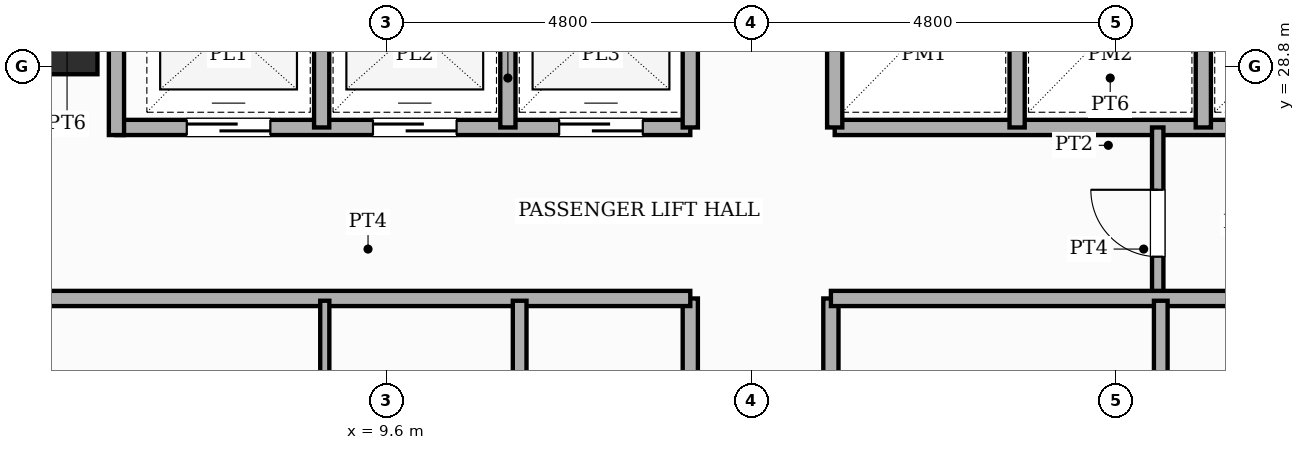
"""IFC4 building model, lengths in metres.
Left out: names, types, materials, properties, quantities, classifications, styles, units other than length and angle.
Written with IfcOpenShell. Run it as: python <this file> out.ifc"""

import sys

from ifc_helpers import new_model, si_unit, direction, frame, frame_2d, origin, origin_2d, place, context, subcontext, project, spatial, rectangle, extrude, element, fill, save


model = new_model("IFC4")
c1 = context("Model", 3, precision=1e-05, world=origin(), true_north=direction((0.0, 1.0)))
c2 = subcontext(c1, "Body", "Model", "MODEL_VIEW")
j1 = project(units=[si_unit("LENGTHUNIT", "METRE"), si_unit("PLANEANGLEUNIT", "RADIAN")], contexts=[c1])
p1 = place(None, origin())
s1 = spatial("IfcSite", under=j1, at=p1, CompositionType="ELEMENT")
p2 = place(p1, origin())
s2 = spatial("IfcBuilding", under=s1, at=p2, CompositionType="ELEMENT")
p3 = place(p2, frame((0.0, 0.0, 57.4)))
s3 = spatial("IfcBuildingStorey", under=s2, at=p3, CompositionType="ELEMENT", Elevation=57.4)
p4 = place(p3, frame((5.25, 29.25, 0.0), z_axis=(0.0, 0.0, 1.0), x_axis=(1.0, 0.0, 0.0)))
e1 = element("IfcColumn", 1, at=p4, inside=s3, PredefinedType="COLUMN", context=c2, shape_type="SweptSolid", body=[
    extrude(rectangle(XDim=1.1, YDim=1.1, at=origin_2d()), origin(), (0.0, 0.0, 1.0), 3.6),
])
p5 = place(p3, frame((6.05, 28.0, 0.0), z_axis=(0.0, 0.0, 1.0), x_axis=(1.0, 0.0, 0.0)))
e2 = element("IfcWall", 2, at=p5, inside=s3, PredefinedType="POLYGONAL", context=c2, shape_type="SweptSolid", body=[
    extrude(rectangle(XDim=7.55, YDim=0.2, at=frame_2d((3.775, 0.0))), origin(), (0.0, 0.0, 1.0), 3.35),
])
p6 = place(p5, frame((0.925, 0.0, 0.0)))
e3 = element("IfcOpeningElement", 3, at=p6, cuts=e2, PredefinedType="OPENING", context=c2, shape_type="SweptSolid", body=[
    extrude(rectangle(XDim=1.1, YDim=2.15, at=frame_2d((0.55, 1.075))), frame((0.0, 0.11, 0.0), z_axis=(0.0, -1.0, 0.0), x_axis=(1.0, 0.0, 0.0)), (0.0, 0.0, 1.0), 0.22),
])
p7 = place(p5, frame((3.375, 0.0, 0.0)))
e4 = element("IfcOpeningElement", 4, at=p7, cuts=e2, PredefinedType="OPENING", context=c2, shape_type="SweptSolid", body=[
    extrude(rectangle(XDim=1.1, YDim=2.15, at=frame_2d((0.55, 1.075))), frame((0.0, 0.11, 0.0), z_axis=(0.0, -1.0, 0.0), x_axis=(1.0, 0.0, 0.0)), (0.0, 0.0, 1.0), 0.22),
])
p8 = place(p5, frame((5.825, 0.0, 0.0)))
e5 = element("IfcOpeningElement", 5, at=p8, cuts=e2, PredefinedType="OPENING", context=c2, shape_type="SweptSolid", body=[
    extrude(rectangle(XDim=1.1, YDim=2.15, at=frame_2d((0.55, 1.075))), frame((0.0, 0.11, 0.0), z_axis=(0.0, -1.0, 0.0), x_axis=(1.0, 0.0, 0.0)), (0.0, 0.0, 1.0), 0.22),
])
p9 = place(p3, frame((15.5, 28.0, 0.0), z_axis=(0.0, 0.0, 1.0), x_axis=(1.0, 0.0, 0.0)))
e6 = element("IfcWall", 6, at=p9, inside=s3, PredefinedType="POLYGONAL", context=c2, shape_type="SweptSolid", body=[
    extrude(rectangle(XDim=7.25, YDim=0.2, at=frame_2d((3.625, 0.0))), origin(), (0.0, 0.0, 1.0), 3.35),
])
p10 = place(p3, frame((6.05, 27.9, 0.0), z_axis=(0.0, 0.0, 1.0), x_axis=(0.0, 1.0, 0.0)))
e7 = element("IfcWall", 7, at=p10, inside=s3, PredefinedType="POLYGONAL", context=c2, shape_type="SweptSolid", body=[
    extrude(rectangle(XDim=3.0, YDim=0.2, at=frame_2d((1.5, 0.0))), origin(), (0.0, 0.0, 1.0), 3.35),
])
for number, where, z_axis, x_axis in (
    (8, (13.6, 28.0, 0.0), (0.0, 0.0, 1.0), (0.0, 1.0, 0.0)),
    (9, (15.5, 28.0, 0.0), (0.0, 0.0, 1.0), (0.0, 1.0, 0.0)),
    (10, (8.75, 28.0, 0.0), (0.0, 0.0, 1.0), (0.0, 1.0, 0.0)),
    (11, (11.2, 28.0, 0.0), (0.0, 0.0, 1.0), (0.0, 1.0, 0.0)),
    (12, (17.9, 28.0, 0.0), (0.0, 0.0, 1.0), (0.0, 1.0, 0.0)),
    (13, (20.35, 28.0, 0.0), (0.0, 0.0, 1.0), (0.0, 1.0, 0.0)),
):
    element("IfcWall", number, at=place(p3, frame(where, z_axis=z_axis, x_axis=x_axis)), inside=s3, PredefinedType="POLYGONAL", context=c2, shape_type="SweptSolid", body=[
        extrude(rectangle(XDim=2.9, YDim=0.2, at=frame_2d((1.45, 0.0))), origin(), (0.0, 0.0, 1.0), 3.35),
    ])
p11 = place(p3, frame((19.75, 25.75, 0.0), z_axis=(0.0, 0.0, 1.0), x_axis=(0.0, 1.0, 0.0)))
e14 = element("IfcWall", 14, at=p11, inside=s3, PredefinedType="PARTITIONING", context=c2, shape_type="SweptSolid", body=[
    extrude(rectangle(XDim=2.25, YDim=0.15, at=frame_2d((1.125, 0.0))), origin(), (0.0, 0.0, 1.0), 3.35),
])
p12 = place(p11, frame((0.55, 0.0, 0.0)))
e15 = element("IfcOpeningElement", 15, at=p12, cuts=e14, PredefinedType="OPENING", context=c2, shape_type="SweptSolid", body=[
    extrude(rectangle(XDim=0.88, YDim=2.1, at=frame_2d((0.44, 1.05))), frame((0.0, 0.085, 0.0), z_axis=(0.0, -1.0, 0.0), x_axis=(1.0, 0.0, 0.0)), (0.0, 0.0, 1.0), 0.17),
])
p13 = place(p3, frame((13.6, 5.12, 0.0), z_axis=(0.0, 0.0, 1.0), x_axis=(0.0, 1.0, 0.0)))
e16 = element("IfcWall", 16, at=p13, inside=s3, PredefinedType="PARTITIONING", context=c2, shape_type="SweptSolid", body=[
    extrude(rectangle(XDim=20.63, YDim=0.2, at=frame_2d((10.315, 0.0))), origin(), (0.0, 0.0, 1.0), 3.35),
])
p14 = place(p13, frame((2.939, 0.0, 0.0)))
e17 = element("IfcOpeningElement", 17, at=p14, cuts=e16, PredefinedType="OPENING", context=c2, shape_type="SweptSolid", body=[
    extrude(rectangle(XDim=0.98, YDim=2.18, at=frame_2d((0.49, 1.09))), frame((0.0, 0.11, 0.0), z_axis=(0.0, -1.0, 0.0), x_axis=(1.0, 0.0, 0.0)), (0.0, 0.0, 1.0), 0.22),
])
p15 = place(p13, frame((12.576, 0.0, 0.0)))
e18 = element("IfcOpeningElement", 18, at=p15, cuts=e16, PredefinedType="OPENING", context=c2, shape_type="SweptSolid", body=[
    extrude(rectangle(XDim=0.98, YDim=2.18, at=frame_2d((0.49, 1.09))), frame((0.0, 0.11, 0.0), z_axis=(0.0, -1.0, 0.0), x_axis=(1.0, 0.0, 0.0)), (0.0, 0.0, 1.0), 0.22),
])
p16 = place(p3, frame((15.45, 5.12, 0.0), z_axis=(0.0, 0.0, 1.0), x_axis=(0.0, 1.0, 0.0)))
e19 = element("IfcWall", 19, at=p16, inside=s3, PredefinedType="PARTITIONING", context=c2, shape_type="SweptSolid", body=[
    extrude(rectangle(XDim=20.63, YDim=0.2, at=frame_2d((10.315, 0.0))), origin(), (0.0, 0.0, 1.0), 3.35),
])
p17 = place(p16, frame((1.001, 0.0, 0.0)))
e20 = element("IfcOpeningElement", 20, at=p17, cuts=e19, PredefinedType="OPENING", context=c2, shape_type="SweptSolid", body=[
    extrude(rectangle(XDim=0.98, YDim=2.18, at=frame_2d((0.49, 1.09))), frame((0.0, 0.11, 0.0), z_axis=(0.0, -1.0, 0.0), x_axis=(1.0, 0.0, 0.0)), (0.0, 0.0, 1.0), 0.22),
])
p18 = place(p16, frame((5.88, 0.0, 0.0)))
e21 = element("IfcOpeningElement", 21, at=p18, cuts=e19, PredefinedType="OPENING", context=c2, shape_type="SweptSolid", body=[
    extrude(rectangle(XDim=0.98, YDim=2.18, at=frame_2d((0.49, 1.09))), frame((0.0, 0.11, 0.0), z_axis=(0.0, -1.0, 0.0), x_axis=(1.0, 0.0, 0.0)), (0.0, 0.0, 1.0), 0.22),
])
p19 = place(p16, frame((11.28, 0.0, 0.0)))
e22 = element("IfcOpeningElement", 22, at=p19, cuts=e19, PredefinedType="OPENING", context=c2, shape_type="SweptSolid", body=[
    extrude(rectangle(XDim=0.98, YDim=2.18, at=frame_2d((0.49, 1.09))), frame((0.0, 0.11, 0.0), z_axis=(0.0, -1.0, 0.0), x_axis=(1.0, 0.0, 0.0)), (0.0, 0.0, 1.0), 0.22),
])
p20 = place(p16, frame((16.28, 0.0, 0.0)))
e23 = element("IfcOpeningElement", 23, at=p20, cuts=e19, PredefinedType="OPENING", context=c2, shape_type="SweptSolid", body=[
    extrude(rectangle(XDim=0.98, YDim=2.18, at=frame_2d((0.49, 1.09))), frame((0.0, 0.11, 0.0), z_axis=(0.0, -1.0, 0.0), x_axis=(1.0, 0.0, 0.0)), (0.0, 0.0, 1.0), 0.22),
])
p21 = place(p3, frame((5.12, 25.75, 0.0), z_axis=(0.0, 0.0, 1.0), x_axis=(1.0, 0.0, 0.0)))
e24 = element("IfcWall", 24, at=p21, inside=s3, PredefinedType="PARTITIONING", context=c2, shape_type="SweptSolid", body=[
    extrude(rectangle(XDim=8.48, YDim=0.2, at=frame_2d((4.24, 0.0))), origin(), (0.0, 0.0, 1.0), 3.35),
])
p22 = place(p3, frame((15.45, 25.75, 0.0), z_axis=(0.0, 0.0, 1.0), x_axis=(1.0, 0.0, 0.0)))
e25 = element("IfcWall", 25, at=p22, inside=s3, PredefinedType="PARTITIONING", context=c2, shape_type="SweptSolid", body=[
    extrude(rectangle(XDim=8.23, YDim=0.2, at=frame_2d((4.115, 0.0))), origin(), (0.0, 0.0, 1.0), 3.35),
])
p23 = place(p3, frame((8.791, 21.132, 0.0), z_axis=(0.0, 0.0, 1.0), x_axis=(0.0, 1.0, 0.0)))
e26 = element("IfcWall", 26, at=p23, inside=s3, PredefinedType="PARTITIONING", context=c2, shape_type="SweptSolid", body=[
    extrude(rectangle(XDim=4.588, YDim=0.12, at=frame_2d((2.294, 0.0))), origin(), (0.0, 0.0, 1.0), 3.35),
])
p24 = place(p3, frame((11.355, 21.132, 0.0), z_axis=(0.0, 0.0, 1.0), x_axis=(0.0, 1.0, 0.0)))
e27 = element("IfcWall", 27, at=p24, inside=s3, PredefinedType="PLUMBINGWALL", context=c2, shape_type="SweptSolid", body=[
    extrude(rectangle(XDim=4.588, YDim=0.18, at=frame_2d((2.294, 0.0))), origin(), (0.0, 0.0, 1.0), 3.35),
])
p25 = place(p3, frame((19.79, 22.94, 0.0), z_axis=(0.0, 0.0, 1.0), x_axis=(0.0, 1.0, 0.0)))
e28 = element("IfcWall", 28, at=p25, inside=s3, PredefinedType="PLUMBINGWALL", context=c2, shape_type="SweptSolid", body=[
    extrude(rectangle(XDim=2.78, YDim=0.18, at=frame_2d((1.39, 0.0))), origin(), (0.0, 0.0, 1.0), 3.35),
])
p26 = place(p6, origin())
e29 = element("IfcDoor", 29, at=p26, inside=s3, OperationType="SLIDING_TO_LEFT", PredefinedType="DOOR", context=c2, shape_type="SweptSolid", body=[
    extrude(rectangle(XDim=1.1, YDim=2.15, at=frame_2d((0.55, 1.075))), frame((0.0, 0.025, 0.0), z_axis=(0.0, -1.0, 0.0), x_axis=(1.0, 0.0, 0.0)), (0.0, 0.0, 1.0), 0.05),
])
fill(e3, e29)
p27 = place(p7, origin())
e30 = element("IfcDoor", 30, at=p27, inside=s3, OperationType="SLIDING_TO_RIGHT", PredefinedType="DOOR", context=c2, shape_type="SweptSolid", body=[
    extrude(rectangle(XDim=1.1, YDim=2.15, at=frame_2d((0.55, 1.075))), frame((0.0, 0.025, 0.0), z_axis=(0.0, -1.0, 0.0), x_axis=(1.0, 0.0, 0.0)), (0.0, 0.0, 1.0), 0.05),
])
fill(e4, e30)
p28 = place(p8, origin())
e31 = element("IfcDoor", 31, at=p28, inside=s3, OperationType="SLIDING_TO_LEFT", PredefinedType="DOOR", context=c2, shape_type="SweptSolid", body=[
    extrude(rectangle(XDim=1.1, YDim=2.15, at=frame_2d((0.55, 1.075))), frame((0.0, 0.025, 0.0), z_axis=(0.0, -1.0, 0.0), x_axis=(1.0, 0.0, 0.0)), (0.0, 0.0, 1.0), 0.05),
])
fill(e5, e31)
p29 = place(p12, origin())
e32 = element("IfcDoor", 32, at=p29, inside=s3, OperationType="SINGLE_SWING_RIGHT", PredefinedType="DOOR", context=c2, shape_type="SweptSolid", body=[
    extrude(rectangle(XDim=0.88, YDim=2.1, at=frame_2d((0.44, 1.05))), frame((0.0, 0.025, 0.0), z_axis=(0.0, -1.0, 0.0), x_axis=(1.0, 0.0, 0.0)), (0.0, 0.0, 1.0), 0.05),
])
fill(e15, e32)
save(model, sys.argv[1])
